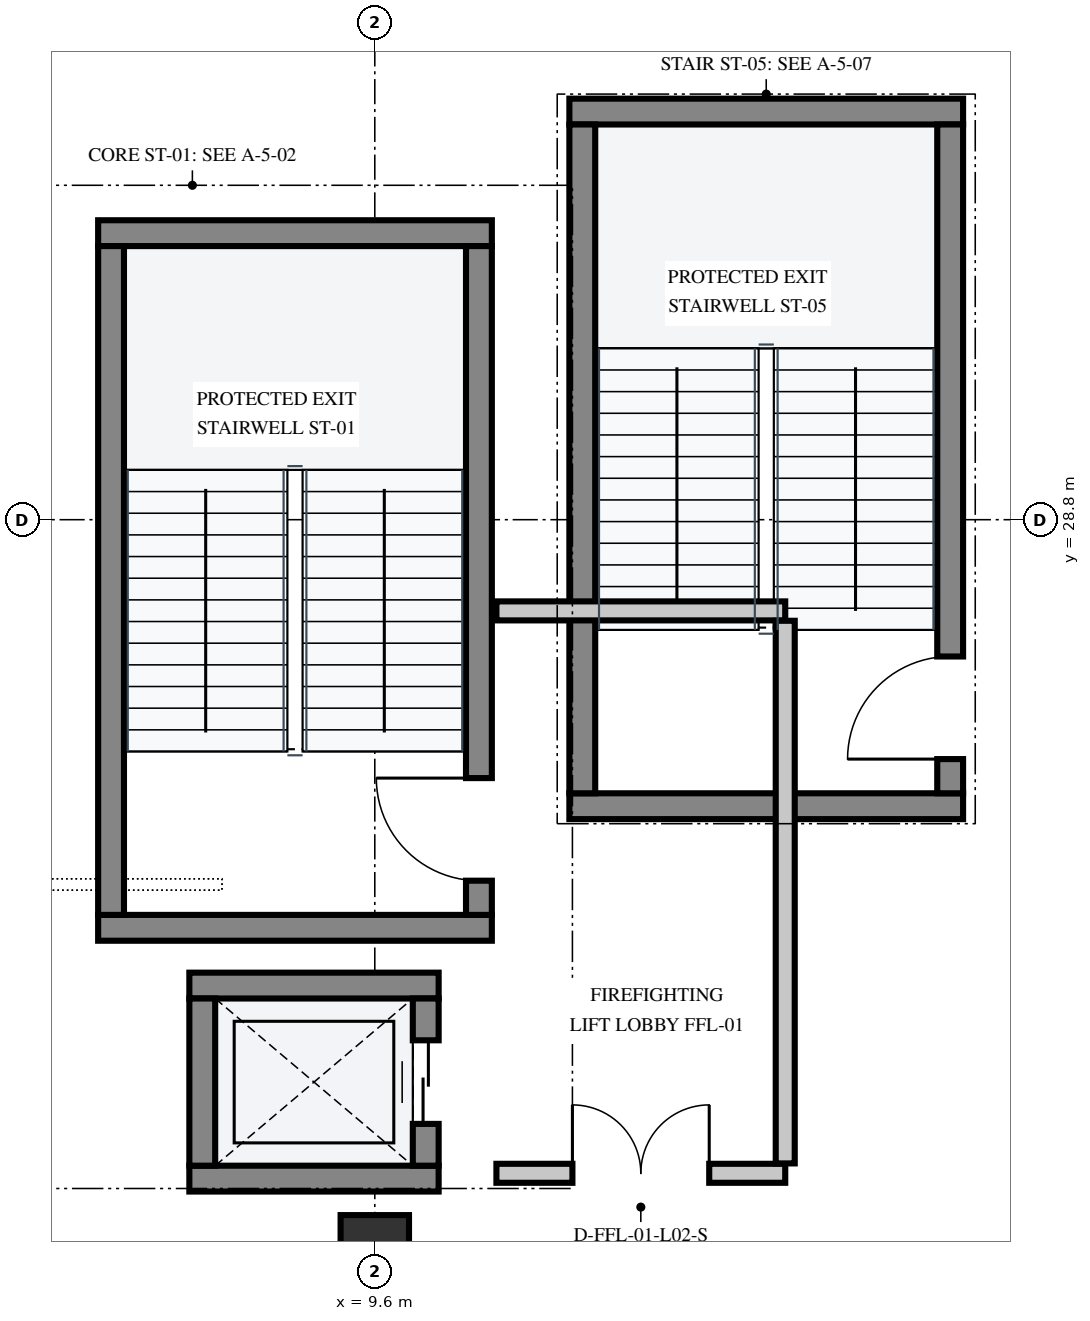
"""IFC4 building model, lengths in metres.
Left out: names, types, materials, properties, quantities, classifications, styles, units other than length and angle.
Written with IfcOpenShell. Run it as: python <this file> out.ifc"""

import sys

from ifc_helpers import new_model, si_unit, direction, frame, frame_2d, origin, origin_2d, place, context, subcontext, project, spatial, rectangle, extrude, element, fill, save


model = new_model("IFC4")
c1 = context("Model", 3, precision=1e-05, world=origin(), true_north=direction((0.0, 1.0)))
c2 = subcontext(c1, "Body", "Model", "MODEL_VIEW")
j1 = project(units=[si_unit("LENGTHUNIT", "METRE"), si_unit("PLANEANGLEUNIT", "RADIAN")], contexts=[c1])
p1 = place(None, origin())
s1 = spatial("IfcSite", under=j1, at=p1, CompositionType="ELEMENT")
p2 = place(p1, origin())
s2 = spatial("IfcBuilding", under=s1, at=p2, CompositionType="ELEMENT")
p3 = place(p2, frame((0.0, 0.0, 10.2)))
s3 = spatial("IfcBuildingStorey", under=s2, at=p3, CompositionType="ELEMENT", Elevation=10.2)
p4 = place(p3, frame((9.6, 19.2, 0.0), z_axis=(0.0, 0.0, 1.0), x_axis=(1.0, 0.0, 0.0)))
e1 = element("IfcColumn", 1, at=p4, inside=s3, PredefinedType="COLUMN", context=c2, shape_type="SweptSolid", body=[
    extrude(rectangle(XDim=0.9, YDim=0.9, at=origin_2d()), origin(), (0.0, 0.0, 1.0), 4.8),
])
for number, where, z_axis, x_axis in (
    (2, (5.96, 23.43, 0.0), (0.0, 0.0, 1.0), (1.0, 0.0, 0.0)),
    (3, (5.96, 32.57, 0.0), (0.0, 0.0, 1.0), (1.0, 0.0, 0.0)),
):
    element("IfcWall", number, at=place(p3, frame(where, z_axis=z_axis, x_axis=x_axis)), inside=s3, PredefinedType="SHEAR", context=c2, shape_type="SweptSolid", body=[
        extrude(rectangle(XDim=5.18, YDim=0.34, at=frame_2d((2.59, 0.0))), origin(), (0.0, 0.0, 1.0), 4.515),
    ])
p5 = place(p3, frame((10.97, 23.6, 0.0), z_axis=(0.0, 0.0, 1.0), x_axis=(0.0, 1.0, 0.0)))
e4 = element("IfcWall", 4, at=p5, inside=s3, PredefinedType="SHEAR", context=c2, shape_type="SweptSolid", body=[
    extrude(rectangle(XDim=8.8, YDim=0.34, at=frame_2d((4.4, 0.0))), origin(), (0.0, 0.0, 1.0), 4.515),
])
p6 = place(p5, frame((0.45, 0.0, 0.0)))
e5 = element("IfcOpeningElement", 5, at=p6, cuts=e4, PredefinedType="OPENING", context=c2, shape_type="SweptSolid", body=[
    extrude(rectangle(XDim=1.35, YDim=2.2, at=frame_2d((0.675, 1.1))), frame((0.0, 0.182, 0.0), z_axis=(0.0, -1.0, 0.0), x_axis=(1.0, 0.0, 0.0)), (0.0, 0.0, 1.0), 0.364),
])
p7 = place(p3, frame((6.13, 23.6, 0.0), z_axis=(0.0, 0.0, 1.0), x_axis=(0.0, 1.0, 0.0)))
e6 = element("IfcWall", 6, at=p7, inside=s3, PredefinedType="SHEAR", context=c2, shape_type="SweptSolid", body=[
    extrude(rectangle(XDim=8.8, YDim=0.34, at=frame_2d((4.4, 0.0))), origin(), (0.0, 0.0, 1.0), 4.515),
])
for number, where, z_axis, x_axis in (
    (7, (12.16, 25.03, 0.0), (0.0, 0.0, 1.0), (1.0, 0.0, 0.0)),
    (8, (12.16, 34.17, 0.0), (0.0, 0.0, 1.0), (1.0, 0.0, 0.0)),
):
    element("IfcWall", number, at=place(p3, frame(where, z_axis=z_axis, x_axis=x_axis)), inside=s3, PredefinedType="SHEAR", context=c2, shape_type="SweptSolid", body=[
        extrude(rectangle(XDim=5.18, YDim=0.34, at=frame_2d((2.59, 0.0))), origin(), (0.0, 0.0, 1.0), 4.515),
    ])
p8 = place(p3, frame((17.17, 25.2, 0.0), z_axis=(0.0, 0.0, 1.0), x_axis=(0.0, 1.0, 0.0)))
e9 = element("IfcWall", 9, at=p8, inside=s3, PredefinedType="SHEAR", context=c2, shape_type="SweptSolid", body=[
    extrude(rectangle(XDim=8.8, YDim=0.34, at=frame_2d((4.4, 0.0))), origin(), (0.0, 0.0, 1.0), 4.515),
])
p9 = place(p8, frame((0.45, 0.0, 0.0)))
e10 = element("IfcOpeningElement", 10, at=p9, cuts=e9, PredefinedType="OPENING", context=c2, shape_type="SweptSolid", body=[
    extrude(rectangle(XDim=1.35, YDim=2.2, at=frame_2d((0.675, 1.1))), frame((0.0, 0.182, 0.0), z_axis=(0.0, -1.0, 0.0), x_axis=(1.0, 0.0, 0.0)), (0.0, 0.0, 1.0), 0.364),
])
p10 = place(p3, frame((12.33, 25.2, 0.0), z_axis=(0.0, 0.0, 1.0), x_axis=(0.0, 1.0, 0.0)))
e11 = element("IfcWall", 11, at=p10, inside=s3, PredefinedType="SHEAR", context=c2, shape_type="SweptSolid", body=[
    extrude(rectangle(XDim=8.8, YDim=0.34, at=frame_2d((4.4, 0.0))), origin(), (0.0, 0.0, 1.0), 4.515),
])
for number, where, z_axis, x_axis in (
    (12, (7.16, 20.13, 0.0), (0.0, 0.0, 1.0), (1.0, 0.0, 0.0)),
    (13, (7.16, 22.67, 0.0), (0.0, 0.0, 1.0), (1.0, 0.0, 0.0)),
):
    element("IfcWall", number, at=place(p3, frame(where, z_axis=z_axis, x_axis=x_axis)), inside=s3, PredefinedType="SHEAR", context=c2, shape_type="SweptSolid", body=[
        extrude(rectangle(XDim=3.28, YDim=0.34, at=frame_2d((1.64, 0.0))), origin(), (0.0, 0.0, 1.0), 4.515),
    ])
p11 = place(p3, frame((7.33, 20.3, 0.0), z_axis=(0.0, 0.0, 1.0), x_axis=(0.0, 1.0, 0.0)))
e14 = element("IfcWall", 14, at=p11, inside=s3, PredefinedType="SHEAR", context=c2, shape_type="SweptSolid", body=[
    extrude(rectangle(XDim=2.2, YDim=0.34, at=frame_2d((1.1, 0.0))), origin(), (0.0, 0.0, 1.0), 4.515),
])
p12 = place(p3, frame((10.27, 20.3, 0.0), z_axis=(0.0, 0.0, 1.0), x_axis=(0.0, 1.0, 0.0)))
e15 = element("IfcWall", 15, at=p12, inside=s3, PredefinedType="SHEAR", context=c2, shape_type="SweptSolid", body=[
    extrude(rectangle(XDim=2.2, YDim=0.34, at=frame_2d((1.1, 0.0))), origin(), (0.0, 0.0, 1.0), 4.515),
])
p13 = place(p12, frame((0.55, 0.0, 0.0)))
e16 = element("IfcOpeningElement", 16, at=p13, cuts=e15, PredefinedType="OPENING", context=c2, shape_type="SweptSolid", body=[
    extrude(rectangle(XDim=1.1, YDim=2.15, at=frame_2d((0.55, 1.075))), frame((0.0, 0.182, 0.0), z_axis=(0.0, -1.0, 0.0), x_axis=(1.0, 0.0, 0.0)), (0.0, 0.0, 1.0), 0.364),
])
p14 = place(p3, frame((11.2, 20.2, 0.0), z_axis=(0.0, 0.0, 1.0), x_axis=(1.0, 0.0, 0.0)))
e17 = element("IfcWall", 17, at=p14, inside=s3, PredefinedType="PARTITIONING", context=c2, shape_type="SweptSolid", body=[
    extrude(rectangle(XDim=3.8, YDim=0.25, at=frame_2d((1.9, 0.0))), origin(), (0.0, 0.0, 1.0), 4.515),
])
p15 = place(p14, frame((1.0, 0.0, 0.0)))
e18 = element("IfcOpeningElement", 18, at=p15, cuts=e17, PredefinedType="OPENING", context=c2, shape_type="SweptSolid", body=[
    extrude(rectangle(XDim=1.8, YDim=2.25, at=frame_2d((0.9, 1.125))), frame((0.0, 0.137, 0.0), z_axis=(0.0, -1.0, 0.0), x_axis=(1.0, 0.0, 0.0)), (0.0, 0.0, 1.0), 0.274),
])
p16 = place(p3, frame((11.2, 27.6, 0.0), z_axis=(0.0, 0.0, 1.0), x_axis=(1.0, 0.0, 0.0)))
e19 = element("IfcWall", 19, at=p16, inside=s3, PredefinedType="PARTITIONING", context=c2, shape_type="SweptSolid", body=[
    extrude(rectangle(XDim=3.8, YDim=0.25, at=frame_2d((1.9, 0.0))), origin(), (0.0, 0.0, 1.0), 4.515),
])
p17 = place(p3, frame((15.0, 20.33, 0.0), z_axis=(0.0, 0.0, 1.0), x_axis=(0.0, 1.0, 0.0)))
e20 = element("IfcWall", 20, at=p17, inside=s3, PredefinedType="PARTITIONING", context=c2, shape_type="SweptSolid", body=[
    extrude(rectangle(XDim=7.14, YDim=0.25, at=frame_2d((3.57, 0.0))), origin(), (0.0, 0.0, 1.0), 4.515),
])
p18 = place(p6, origin())
e21 = element("IfcDoor", 21, at=p18, inside=s3, OperationType="SINGLE_SWING_RIGHT", PredefinedType="DOOR", context=c2, shape_type="SweptSolid", body=[
    extrude(rectangle(XDim=1.35, YDim=2.2, at=frame_2d((0.675, 1.1))), frame((0.0, 0.025, 0.0), z_axis=(0.0, -1.0, 0.0), x_axis=(1.0, 0.0, 0.0)), (0.0, 0.0, 1.0), 0.05),
])
fill(e5, e21)
p19 = place(p9, origin())
e22 = element("IfcDoor", 22, at=p19, inside=s3, OperationType="SINGLE_SWING_LEFT", PredefinedType="DOOR", context=c2, shape_type="SweptSolid", body=[
    extrude(rectangle(XDim=1.35, YDim=2.2, at=frame_2d((0.675, 1.1))), frame((0.0, 0.025, 0.0), z_axis=(0.0, -1.0, 0.0), x_axis=(1.0, 0.0, 0.0)), (0.0, 0.0, 1.0), 0.05),
])
fill(e10, e22)
p20 = place(p13, origin())
e23 = element("IfcDoor", 23, at=p20, inside=s3, OperationType="DOUBLE_DOOR_SLIDING", PredefinedType="DOOR", context=c2, shape_type="SweptSolid", body=[
    extrude(rectangle(XDim=1.1, YDim=2.15, at=frame_2d((0.55, 1.075))), frame((0.0, 0.025, 0.0), z_axis=(0.0, -1.0, 0.0), x_axis=(1.0, 0.0, 0.0)), (0.0, 0.0, 1.0), 0.05),
])
fill(e16, e23)
p21 = place(p15, origin())
e24 = element("IfcDoor", 24, at=p21, inside=s3, OperationType="DOUBLE_DOOR_SINGLE_SWING", PredefinedType="DOOR", context=c2, shape_type="SweptSolid", body=[
    extrude(rectangle(XDim=1.8, YDim=2.25, at=frame_2d((0.9, 1.125))), frame((0.0, 0.025, 0.0), z_axis=(0.0, -1.0, 0.0), x_axis=(1.0, 0.0, 0.0)), (0.0, 0.0, 1.0), 0.05),
])
fill(e18, e24)
save(model, sys.argv[1])
